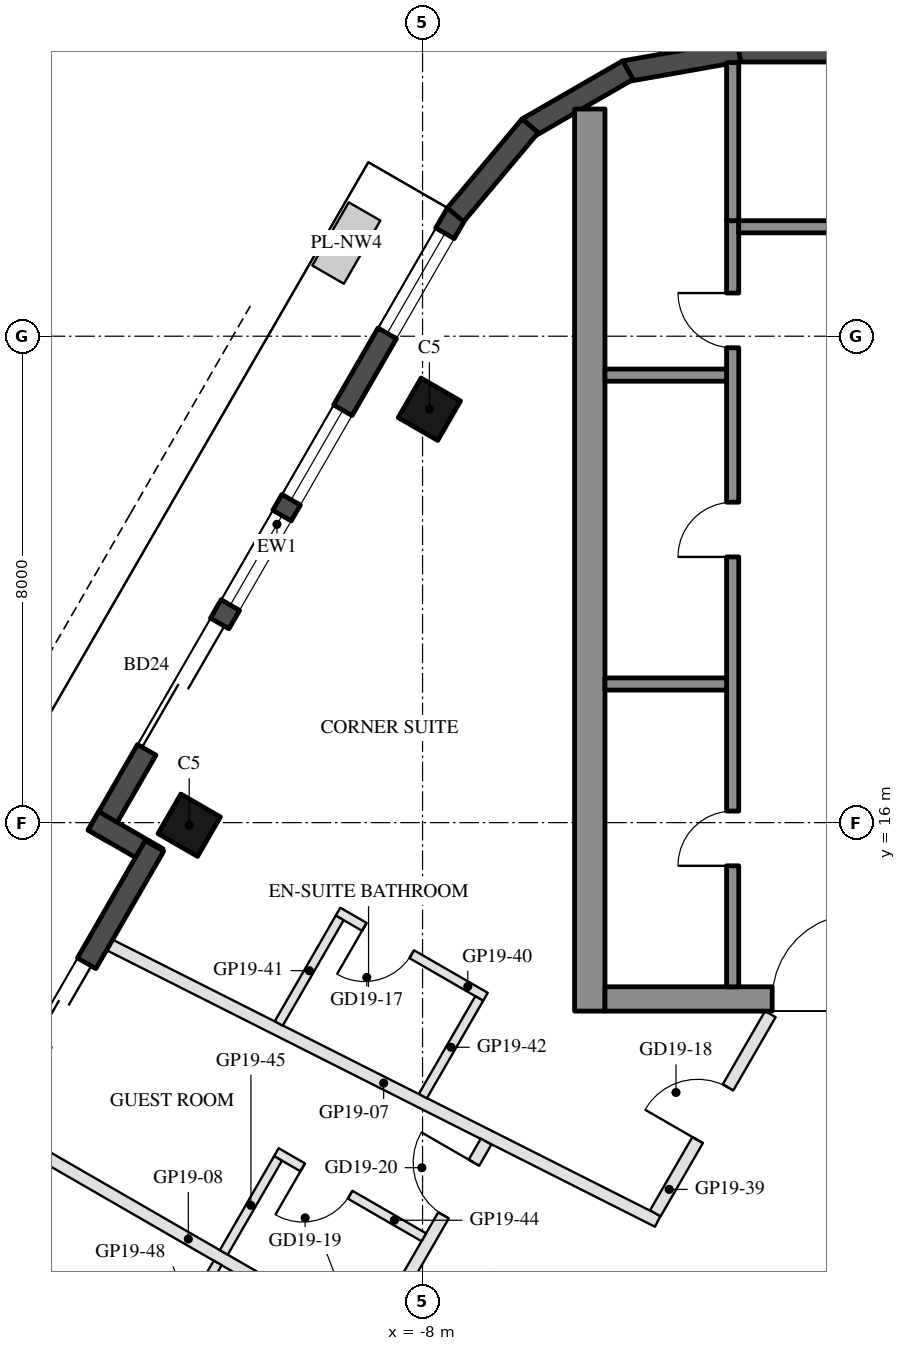
"""IFC4 building model, lengths in metres.
Left out: names, types, materials, properties, quantities, classifications, styles, units other than length and angle.
Written with IfcOpenShell. Run it as: python <this file> out.ifc"""

import sys

from ifc_helpers import new_model, si_unit, direction, frame, frame_2d, origin, origin_2d, place, context, subcontext, project, spatial, rectangle, hollow_rectangle, extrude, element, fill, save


model = new_model("IFC4")
c1 = context("Model", 3, precision=1e-05, world=origin(), true_north=direction((0.0, 1.0)))
c2 = subcontext(c1, "Body", "Model", "MODEL_VIEW")
j1 = project(units=[si_unit("LENGTHUNIT", "METRE"), si_unit("PLANEANGLEUNIT", "RADIAN")], contexts=[c1])
p1 = place(None, origin())
s1 = spatial("IfcSite", under=j1, at=p1, CompositionType="ELEMENT")
p2 = place(p1, origin())
s2 = spatial("IfcBuilding", under=s1, at=p2, CompositionType="ELEMENT")
p3 = place(p2, frame((0.0, 0.0, 202.1)))
s3 = spatial("IfcBuildingStorey", under=s2, at=p3, CompositionType="ELEMENT", Elevation=202.1)
for number, where, z_axis, x_axis in (
    (1, (-7.888, 22.798, 0.0), (0.0, 0.0, 1.0), (0.5, 0.866, 0.0)),
    (2, (-11.838, 15.957, 0.0), (0.0, 0.0, 1.0), (0.5, 0.866, 0.0)),
):
    element("IfcColumn", number, at=place(p3, frame(where, z_axis=z_axis, x_axis=x_axis)), inside=s3, PredefinedType="COLUMN", context=c2, shape_type="SweptSolid", body=[
        extrude(hollow_rectangle(XDim=0.75, YDim=0.75, WallThickness=0.035, at=origin_2d()), origin(), (0.0, 0.0, 1.0), 3.7),
    ])
p4 = place(p3, frame((-7.441, 26.022, 0.0), z_axis=(0.0, 0.0, 1.0), x_axis=(-0.499992533062, -0.86602971478, 0.0)))
e3 = element("IfcWall", 3, at=p4, inside=s3, PredefinedType="SOLIDWALL", context=c2, shape_type="SweptSolid", body=[
    extrude(rectangle(XDim=11.816, YDim=0.35, at=frame_2d((5.908, 0.0))), origin(), (0.0, 0.0, 1.0), 3.55),
])
p5 = place(p4, frame((0.381, 0.0, 0.3)))
e4 = element("IfcOpeningElement", 4, at=p5, cuts=e3, PredefinedType="OPENING", context=c2, shape_type="SweptSolid", body=[
    extrude(rectangle(XDim=1.9, YDim=2.65, at=frame_2d((0.95, 1.325))), frame((0.0, 0.185, 0.0), z_axis=(0.0, -1.0, 0.0), x_axis=(1.0, 0.0, 0.0)), (0.0, 0.0, 1.0), 0.37),
])
p6 = place(p4, frame((7.791, 0.0, 0.0)))
e5 = element("IfcOpeningElement", 5, at=p6, cuts=e3, PredefinedType="OPENING", context=c2, shape_type="SweptSolid", body=[
    extrude(rectangle(XDim=2.4, YDim=2.4, at=frame_2d((1.2, 1.2))), frame((0.0, 0.185, 0.0), z_axis=(0.0, -1.0, 0.0), x_axis=(1.0, 0.0, 0.0)), (0.0, 0.0, 1.0), 0.37),
])
p7 = place(p4, frame((3.741, 0.0, 0.3)))
e6 = element("IfcOpeningElement", 6, at=p7, cuts=e3, PredefinedType="OPENING", context=c2, shape_type="SweptSolid", body=[
    extrude(rectangle(XDim=1.7, YDim=2.65, at=frame_2d((0.85, 1.325))), frame((0.0, 0.185, 0.0), z_axis=(0.0, -1.0, 0.0), x_axis=(1.0, 0.0, 0.0)), (0.0, 0.0, 1.0), 0.37),
])
p8 = place(p4, frame((5.741, 0.0, 0.3)))
e7 = element("IfcOpeningElement", 7, at=p8, cuts=e3, PredefinedType="OPENING", context=c2, shape_type="SweptSolid", body=[
    extrude(rectangle(XDim=1.7, YDim=2.65, at=frame_2d((0.85, 1.325))), frame((0.0, 0.185, 0.0), z_axis=(0.0, -1.0, 0.0), x_axis=(1.0, 0.0, 0.0)), (0.0, 0.0, 1.0), 0.37),
])
p9 = place(p3, frame((-13.413, 16.029, 0.0), z_axis=(0.0, 0.0, 1.0), x_axis=(0.866005645448, -0.500034220881, 0.0)))
e8 = element("IfcWall", 8, at=p9, inside=s3, PredefinedType="SOLIDWALL", context=c2, shape_type="SweptSolid", body=[
    extrude(rectangle(XDim=1.22, YDim=0.35, at=frame_2d((0.61, 0.0))), origin(), (0.0, 0.0, 1.0), 3.55),
])
p10 = place(p3, frame((-12.409, 15.617, 0.0), z_axis=(0.0, 0.0, 1.0), x_axis=(-0.500003597184, -0.866023326939, 0.0)))
e9 = element("IfcWall", 9, at=p10, inside=s3, PredefinedType="SOLIDWALL", context=c2, shape_type="SweptSolid", body=[
    extrude(rectangle(XDim=6.74, YDim=0.35, at=frame_2d((3.37, 0.0))), origin(), (0.0, 0.0, 1.0), 3.55),
])
p11 = place(p10, frame((2.229, 0.0, 0.0)))
e10 = element("IfcOpeningElement", 10, at=p11, cuts=e9, PredefinedType="OPENING", context=c2, shape_type="SweptSolid", body=[
    extrude(rectangle(XDim=1.5, YDim=2.4, at=frame_2d((0.75, 1.2))), frame((0.0, 0.185, 0.0), z_axis=(0.0, -1.0, 0.0), x_axis=(1.0, 0.0, 0.0)), (0.0, 0.0, 1.0), 0.37),
])
p12 = place(p10, frame((4.029, 0.0, 0.3)))
e11 = element("IfcOpeningElement", 11, at=p12, cuts=e9, PredefinedType="OPENING", context=c2, shape_type="SweptSolid", body=[
    extrude(rectangle(XDim=0.8, YDim=2.65, at=frame_2d((0.4, 1.325))), frame((0.0, 0.185, 0.0), z_axis=(0.0, -1.0, 0.0), x_axis=(1.0, 0.0, 0.0)), (0.0, 0.0, 1.0), 0.37),
])
p13 = place(p3, frame((2.829, 28.685, 0.0), z_axis=(0.0, 0.0, 1.0), x_axis=(-1.0, 0.0, 0.0)))
e12 = element("IfcWall", 12, at=p13, inside=s3, PredefinedType="SOLIDWALL", context=c2, shape_type="SweptSolid", body=[
    extrude(rectangle(XDim=5.658, YDim=0.35, at=frame_2d((2.829, 0.0))), origin(), (0.0, 0.0, 1.0), 3.55),
])
for number, where, z_axis, x_axis in (
    (13, (-2.799, 28.688, 0.0), (0.0, 0.0, 1.0), (-0.985, -0.174, 0.0)),
    (14, (-4.623, 28.377, 0.0), (0.0, 0.0, 1.0), (-0.866, -0.5, 0.0)),
):
    element("IfcWall", number, at=place(p3, frame(where, z_axis=z_axis, x_axis=x_axis)), inside=s3, PredefinedType="SOLIDWALL", context=c2, shape_type="SweptSolid", body=[
        extrude(rectangle(XDim=1.91, YDim=0.35, at=frame_2d((0.955, 0.0))), origin(), (0.0, 0.0, 1.0), 3.55),
    ])
p14 = place(p3, frame((-6.23, 27.461, 0.0), z_axis=(0.0, 0.0, 1.0), x_axis=(-0.642808304945, -0.766027077259, 0.0)))
e15 = element("IfcWall", 15, at=p14, inside=s3, PredefinedType="SOLIDWALL", context=c2, shape_type="SweptSolid", body=[
    extrude(rectangle(XDim=1.91, YDim=0.35, at=frame_2d((0.955, 0.0))), origin(), (0.0, 0.0, 1.0), 3.55),
])
p15 = place(p3, frame((-5.25, 12.9, 0.0), z_axis=(0.0, 0.0, 1.0), x_axis=(0.0, 1.0, 0.0)))
e16 = element("IfcWall", 16, at=p15, inside=s3, PredefinedType="SHEAR", context=c2, shape_type="SweptSolid", body=[
    extrude(rectangle(XDim=14.837, YDim=0.5, at=frame_2d((7.418, 0.0))), origin(), (0.0, 0.0, 1.0), 3.5),
])
p16 = place(p3, frame((5.0, 13.1, 0.0), z_axis=(0.0, 0.0, 1.0), x_axis=(-1.0, 0.0, 0.0)))
e17 = element("IfcWall", 17, at=p16, inside=s3, PredefinedType="SHEAR", context=c2, shape_type="SweptSolid", body=[
    extrude(rectangle(XDim=10.0, YDim=0.4, at=frame_2d((5.0, 0.0))), origin(), (0.0, 0.0, 1.0), 3.5),
])
p17 = place(p16, frame((3.55, 0.0, 0.0)))
e18 = element("IfcOpeningElement", 18, at=p17, cuts=e17, PredefinedType="OPENING", context=c2, shape_type="SweptSolid", body=[
    extrude(rectangle(XDim=1.1, YDim=2.1, at=frame_2d((0.55, 1.05))), frame((0.0, 0.21, 0.0), z_axis=(0.0, -1.0, 0.0), x_axis=(1.0, 0.0, 0.0)), (0.0, 0.0, 1.0), 0.42),
])
p18 = place(p16, frame((5.85, 0.0, 0.0)))
e19 = element("IfcOpeningElement", 19, at=p18, cuts=e17, PredefinedType="OPENING", context=c2, shape_type="SweptSolid", body=[
    extrude(rectangle(XDim=1.4, YDim=2.1, at=frame_2d((0.7, 1.05))), frame((0.0, 0.21, 0.0), z_axis=(0.0, -1.0, 0.0), x_axis=(1.0, 0.0, 0.0)), (0.0, 0.0, 1.0), 0.42),
])
p19 = place(p3, frame((-2.9, 13.3, 0.0), z_axis=(0.0, 0.0, 1.0), x_axis=(0.0, 1.0, 0.0)))
e20 = element("IfcWall", 20, at=p19, inside=s3, PredefinedType="SHEAR", context=c2, shape_type="SweptSolid", body=[
    extrude(rectangle(XDim=12.6, YDim=0.2, at=frame_2d((6.3, 0.0))), origin(), (0.0, 0.0, 1.0), 3.5),
])
p20 = place(p19, frame((1.99, 0.0, 0.0)))
e21 = element("IfcOpeningElement", 21, at=p20, cuts=e20, PredefinedType="OPENING", context=c2, shape_type="SweptSolid", body=[
    extrude(rectangle(XDim=0.9, YDim=2.1, at=frame_2d((0.45, 1.05))), frame((0.0, 0.11, 0.0), z_axis=(0.0, -1.0, 0.0), x_axis=(1.0, 0.0, 0.0)), (0.0, 0.0, 1.0), 0.22),
])
p21 = place(p19, frame((7.07, 0.0, 0.0)))
e22 = element("IfcOpeningElement", 22, at=p21, cuts=e20, PredefinedType="OPENING", context=c2, shape_type="SweptSolid", body=[
    extrude(rectangle(XDim=0.9, YDim=2.1, at=frame_2d((0.45, 1.05))), frame((0.0, 0.11, 0.0), z_axis=(0.0, -1.0, 0.0), x_axis=(1.0, 0.0, 0.0)), (0.0, 0.0, 1.0), 0.22),
])
p22 = place(p19, frame((10.51, 0.0, 0.0)))
e23 = element("IfcOpeningElement", 23, at=p22, cuts=e20, PredefinedType="OPENING", context=c2, shape_type="SweptSolid", body=[
    extrude(rectangle(XDim=0.9, YDim=2.1, at=frame_2d((0.45, 1.05))), frame((0.0, 0.11, 0.0), z_axis=(0.0, -1.0, 0.0), x_axis=(1.0, 0.0, 0.0)), (0.0, 0.0, 1.0), 0.22),
])
p23 = place(p3, frame((-0.4, 25.8, 0.0), z_axis=(0.0, 0.0, 1.0), x_axis=(-1.0, 0.0, 0.0)))
e24 = element("IfcWall", 24, at=p23, inside=s3, PredefinedType="SHEAR", context=c2, shape_type="SweptSolid", body=[
    extrude(rectangle(XDim=2.4, YDim=0.2, at=frame_2d((1.2, 0.0))), origin(), (0.0, 0.0, 1.0), 3.5),
])
for number, where, z_axis, x_axis in (
    (25, (-3.0, 18.28, 0.0), (0.0, 0.0, 1.0), (-1.0, 0.0, 0.0)),
    (26, (-3.0, 23.36, 0.0), (0.0, 0.0, 1.0), (-1.0, 0.0, 0.0)),
):
    element("IfcWall", number, at=place(p3, frame(where, z_axis=z_axis, x_axis=x_axis)), inside=s3, PredefinedType="SHEAR", context=c2, shape_type="SweptSolid", body=[
        extrude(rectangle(XDim=2.0, YDim=0.2, at=frame_2d((1.0, 0.0))), origin(), (0.0, 0.0, 1.0), 3.5),
    ])
p24 = place(p3, frame((-2.9, 25.9, 0.0), z_axis=(0.0, 0.0, 1.0), x_axis=(0.0, 1.0, 0.0)))
e27 = element("IfcWall", 27, at=p24, inside=s3, PredefinedType="SHEAR", context=c2, shape_type="SweptSolid", body=[
    extrude(rectangle(XDim=2.6, YDim=0.2, at=frame_2d((1.3, 0.0))), origin(), (0.0, 0.0, 1.0), 3.5),
])
p25 = place(p3, frame((-13.147, 13.989, 0.0), z_axis=(0.0, 0.0, 1.0), x_axis=(0.892898572595, -0.450257858408, 0.0)))
e28 = element("IfcWall", 28, at=p25, inside=s3, PredefinedType="PARTITIONING", context=c2, shape_type="SweptSolid", body=[
    extrude(rectangle(XDim=10.096, YDim=0.2, at=frame_2d((5.048, 0.0))), origin(), (0.0, 0.0, 1.0), 3.06),
])
p26 = place(p3, frame((-14.917, 10.922, 0.0), z_axis=(0.0, 0.0, 1.0), x_axis=(0.866019052629, -0.500011000363, 0.0)))
e29 = element("IfcWall", 29, at=p26, inside=s3, PredefinedType="PARTITIONING", context=c2, shape_type="SweptSolid", body=[
    extrude(rectangle(XDim=7.08, YDim=0.2, at=frame_2d((3.54, 0.0))), origin(), (0.0, 0.0, 1.0), 3.06),
])
p27 = place(p3, frame((-4.172, 9.574, 0.0), z_axis=(0.0, 0.0, 1.0), x_axis=(0.499985062256, 0.866034027923, 0.0)))
e30 = element("IfcWall", 30, at=p27, inside=s3, PredefinedType="PARTITIONING", context=c2, shape_type="SweptSolid", body=[
    extrude(rectangle(XDim=3.782, YDim=0.2, at=frame_2d((1.891, 0.0))), origin(), (0.0, 0.0, 1.0), 2.95),
])
p28 = place(p27, frame((1.391, 0.0, 0.0)))
e31 = element("IfcOpeningElement", 31, at=p28, cuts=e30, PredefinedType="OPENING", context=c2, shape_type="SweptSolid", body=[
    extrude(rectangle(XDim=1.0, YDim=2.1, at=frame_2d((0.5, 1.05))), frame((0.0, 0.11, 0.0), z_axis=(0.0, -1.0, 0.0), x_axis=(1.0, 0.0, 0.0)), (0.0, 0.0, 1.0), 0.22),
])
p29 = place(p3, frame((-6.965, 13.136, 0.0), z_axis=(0.0, 0.0, 1.0), x_axis=(-0.866034573852, 0.49998411664, 0.0)))
e32 = element("IfcWall", 32, at=p29, inside=s3, PredefinedType="PARTITIONING", context=c2, shape_type="SweptSolid", body=[
    extrude(rectangle(XDim=2.8, YDim=0.15, at=frame_2d((1.4, 0.0))), origin(), (0.0, 0.0, 1.0), 2.95),
])
p30 = place(p29, frame((1.4, 0.0, 0.0)))
e33 = element("IfcOpeningElement", 33, at=p30, cuts=e32, PredefinedType="OPENING", context=c2, shape_type="SweptSolid", body=[
    extrude(rectangle(XDim=0.9, YDim=2.1, at=frame_2d((0.45, 1.05))), frame((0.0, 0.085, 0.0), z_axis=(0.0, -1.0, 0.0), x_axis=(1.0, 0.0, 0.0)), (0.0, 0.0, 1.0), 0.17),
])
p31 = place(p3, frame((-9.363, 14.433, 0.0), z_axis=(0.0, 0.0, 1.0), x_axis=(-0.500056363668, -0.86599285976, 0.0)))
e34 = element("IfcWall", 34, at=p31, inside=s3, PredefinedType="PARTITIONING", context=c2, shape_type="SweptSolid", body=[
    extrude(rectangle(XDim=2.004, YDim=0.15, at=frame_2d((1.002, 0.0))), origin(), (0.0, 0.0, 1.0), 2.95),
])
p32 = place(p3, frame((-7.068, 13.108, 0.0), z_axis=(0.0, 0.0, 1.0), x_axis=(-0.4999770169, -0.866038672677, 0.0)))
e35 = element("IfcWall", 35, at=p32, inside=s3, PredefinedType="PARTITIONING", context=c2, shape_type="SweptSolid", body=[
    extrude(rectangle(XDim=1.854, YDim=0.15, at=frame_2d((0.927, 0.0))), origin(), (0.0, 0.0, 1.0), 2.95),
])
p33 = place(p3, frame((-8.823, 7.519, 0.0), z_axis=(0.0, 0.0, 1.0), x_axis=(0.500026055714, 0.866010359988, 0.0)))
e36 = element("IfcWall", 36, at=p33, inside=s3, PredefinedType="PARTITIONING", context=c2, shape_type="SweptSolid", body=[
    extrude(rectangle(XDim=3.736, YDim=0.2, at=frame_2d((1.868, 0.0))), origin(), (0.0, 0.0, 1.0), 2.95),
])
p34 = place(p33, frame((2.336, 0.0, 0.0)))
e37 = element("IfcOpeningElement", 37, at=p34, cuts=e36, PredefinedType="OPENING", context=c2, shape_type="SweptSolid", body=[
    extrude(rectangle(XDim=1.0, YDim=2.1, at=frame_2d((0.5, 1.05))), frame((0.0, 0.11, 0.0), z_axis=(0.0, -1.0, 0.0), x_axis=(1.0, 0.0, 0.0)), (0.0, 0.0, 1.0), 0.22),
])
p35 = place(p3, frame((-7.979, 9.18, 0.0), z_axis=(0.0, 0.0, 1.0), x_axis=(-0.866034573852, 0.49998411664, 0.0)))
e38 = element("IfcWall", 38, at=p35, inside=s3, PredefinedType="PARTITIONING", context=c2, shape_type="SweptSolid", body=[
    extrude(rectangle(XDim=2.8, YDim=0.15, at=frame_2d((1.4, 0.0))), origin(), (0.0, 0.0, 1.0), 2.95),
])
p36 = place(p35, frame((1.4, 0.0, 0.0)))
e39 = element("IfcOpeningElement", 39, at=p36, cuts=e38, PredefinedType="OPENING", context=c2, shape_type="SweptSolid", body=[
    extrude(rectangle(XDim=0.9, YDim=2.1, at=frame_2d((0.45, 1.05))), frame((0.0, 0.085, 0.0), z_axis=(0.0, -1.0, 0.0), x_axis=(1.0, 0.0, 0.0)), (0.0, 0.0, 1.0), 0.17),
])
p37 = place(p3, frame((-10.376, 10.478, 0.0), z_axis=(0.0, 0.0, 1.0), x_axis=(-0.500109033781, -0.865962443949, 0.0)))
e40 = element("IfcWall", 40, at=p37, inside=s3, PredefinedType="PARTITIONING", context=c2, shape_type="SweptSolid", body=[
    extrude(rectangle(XDim=1.786, YDim=0.15, at=frame_2d((0.893, 0.0))), origin(), (0.0, 0.0, 1.0), 2.95),
])
p38 = place(p3, frame((-11.369, 8.758, 0.0), z_axis=(0.0, 0.0, 1.0), x_axis=(-0.500042316284, -0.866000971088, 0.0)))
e41 = element("IfcWall", 41, at=p38, inside=s3, PredefinedType="PARTITIONING", context=c2, shape_type="SweptSolid", body=[
    extrude(rectangle(XDim=1.85, YDim=0.15, at=frame_2d((0.925, 0.0))), origin(), (0.0, 0.0, 1.0), 2.95),
])
p39 = place(p5, origin())
e42 = element("IfcWindow", 42, at=p39, inside=s3, PartitioningType="SINGLE_PANEL", PredefinedType="WINDOW", context=c2, shape_type="SweptSolid", body=[
    extrude(rectangle(XDim=1.9, YDim=2.65, at=frame_2d((0.95, 1.325))), frame((0.0, 0.03, 0.0), z_axis=(0.0, -1.0, 0.0), x_axis=(1.0, 0.0, 0.0)), (0.0, 0.0, 1.0), 0.06),
])
fill(e4, e42)
p40 = place(p6, frame((2.4, 0.0, 0.0), z_axis=(0.0, 0.0, 1.0), x_axis=(-1.0, 0.0, 0.0)))
e43 = element("IfcDoor", 43, at=p40, inside=s3, OperationType="SLIDING_TO_LEFT", PredefinedType="DOOR", context=c2, shape_type="SweptSolid", body=[
    extrude(rectangle(XDim=2.4, YDim=2.4, at=frame_2d((1.2, 1.2))), frame((0.0, 0.025, 0.0), z_axis=(0.0, -1.0, 0.0), x_axis=(1.0, 0.0, 0.0)), (0.0, 0.0, 1.0), 0.05),
])
fill(e5, e43)
p41 = place(p7, origin())
e44 = element("IfcWindow", 44, at=p41, inside=s3, PartitioningType="SINGLE_PANEL", PredefinedType="WINDOW", context=c2, shape_type="SweptSolid", body=[
    extrude(rectangle(XDim=1.7, YDim=2.65, at=frame_2d((0.85, 1.325))), frame((0.0, 0.03, 0.0), z_axis=(0.0, -1.0, 0.0), x_axis=(1.0, 0.0, 0.0)), (0.0, 0.0, 1.0), 0.06),
])
fill(e6, e44)
p42 = place(p8, origin())
e45 = element("IfcWindow", 45, at=p42, inside=s3, PartitioningType="SINGLE_PANEL", PredefinedType="WINDOW", context=c2, shape_type="SweptSolid", body=[
    extrude(rectangle(XDim=1.7, YDim=2.65, at=frame_2d((0.85, 1.325))), frame((0.0, 0.03, 0.0), z_axis=(0.0, -1.0, 0.0), x_axis=(1.0, 0.0, 0.0)), (0.0, 0.0, 1.0), 0.06),
])
fill(e7, e45)
p43 = place(p11, frame((1.5, 0.0, 0.0), z_axis=(0.0, 0.0, 1.0), x_axis=(-1.0, 0.0, 0.0)))
e46 = element("IfcDoor", 46, at=p43, inside=s3, OperationType="SLIDING_TO_LEFT", PredefinedType="DOOR", context=c2, shape_type="SweptSolid", body=[
    extrude(rectangle(XDim=1.5, YDim=2.4, at=frame_2d((0.75, 1.2))), frame((0.0, 0.025, 0.0), z_axis=(0.0, -1.0, 0.0), x_axis=(1.0, 0.0, 0.0)), (0.0, 0.0, 1.0), 0.05),
])
fill(e10, e46)
p44 = place(p20, origin())
e47 = element("IfcDoor", 47, at=p44, inside=s3, OperationType="SINGLE_SWING_LEFT", PredefinedType="DOOR", context=c2, shape_type="SweptSolid", body=[
    extrude(rectangle(XDim=0.9, YDim=2.1, at=frame_2d((0.45, 1.05))), frame((0.0, 0.025, 0.0), z_axis=(0.0, -1.0, 0.0), x_axis=(1.0, 0.0, 0.0)), (0.0, 0.0, 1.0), 0.05),
])
fill(e21, e47)
p45 = place(p21, origin())
e48 = element("IfcDoor", 48, at=p45, inside=s3, OperationType="SINGLE_SWING_LEFT", PredefinedType="DOOR", context=c2, shape_type="SweptSolid", body=[
    extrude(rectangle(XDim=0.9, YDim=2.1, at=frame_2d((0.45, 1.05))), frame((0.0, 0.025, 0.0), z_axis=(0.0, -1.0, 0.0), x_axis=(1.0, 0.0, 0.0)), (0.0, 0.0, 1.0), 0.05),
])
fill(e22, e48)
p46 = place(p22, origin())
e49 = element("IfcDoor", 49, at=p46, inside=s3, OperationType="SINGLE_SWING_RIGHT", PredefinedType="DOOR", context=c2, shape_type="SweptSolid", body=[
    extrude(rectangle(XDim=0.9, YDim=2.1, at=frame_2d((0.45, 1.05))), frame((0.0, 0.025, 0.0), z_axis=(0.0, -1.0, 0.0), x_axis=(1.0, 0.0, 0.0)), (0.0, 0.0, 1.0), 0.05),
])
fill(e23, e49)
p47 = place(p18, frame((1.4, 0.0, 0.0), z_axis=(0.0, 0.0, 1.0), x_axis=(-1.0, 0.0, 0.0)))
e50 = element("IfcDoor", 50, at=p47, inside=s3, OperationType="DOUBLE_DOOR_SINGLE_SWING", PredefinedType="DOOR", context=c2, shape_type="SweptSolid", body=[
    extrude(rectangle(XDim=1.4, YDim=2.1, at=frame_2d((0.7, 1.05))), frame((0.0, 0.025, 0.0), z_axis=(0.0, -1.0, 0.0), x_axis=(1.0, 0.0, 0.0)), (0.0, 0.0, 1.0), 0.05),
])
fill(e19, e50)
p48 = place(p30, origin())
e51 = element("IfcDoor", 51, at=p48, inside=s3, OperationType="SINGLE_SWING_RIGHT", PredefinedType="DOOR", context=c2, shape_type="SweptSolid", body=[
    extrude(rectangle(XDim=0.9, YDim=2.1, at=frame_2d((0.45, 1.05))), frame((0.0, 0.025, 0.0), z_axis=(0.0, -1.0, 0.0), x_axis=(1.0, 0.0, 0.0)), (0.0, 0.0, 1.0), 0.05),
])
fill(e33, e51)
p49 = place(p28, origin())
e52 = element("IfcDoor", 52, at=p49, inside=s3, OperationType="SINGLE_SWING_LEFT", PredefinedType="DOOR", context=c2, shape_type="SweptSolid", body=[
    extrude(rectangle(XDim=1.0, YDim=2.1, at=frame_2d((0.5, 1.05))), frame((0.0, 0.025, 0.0), z_axis=(0.0, -1.0, 0.0), x_axis=(1.0, 0.0, 0.0)), (0.0, 0.0, 1.0), 0.05),
])
fill(e31, e52)
p50 = place(p36, origin())
e53 = element("IfcDoor", 53, at=p50, inside=s3, OperationType="SINGLE_SWING_RIGHT", PredefinedType="DOOR", context=c2, shape_type="SweptSolid", body=[
    extrude(rectangle(XDim=0.9, YDim=2.1, at=frame_2d((0.45, 1.05))), frame((0.0, 0.025, 0.0), z_axis=(0.0, -1.0, 0.0), x_axis=(1.0, 0.0, 0.0)), (0.0, 0.0, 1.0), 0.05),
])
fill(e39, e53)
p51 = place(p34, origin())
e54 = element("IfcDoor", 54, at=p51, inside=s3, OperationType="SINGLE_SWING_RIGHT", PredefinedType="DOOR", context=c2, shape_type="SweptSolid", body=[
    extrude(rectangle(XDim=1.0, YDim=2.1, at=frame_2d((0.5, 1.05))), frame((0.0, 0.025, 0.0), z_axis=(0.0, -1.0, 0.0), x_axis=(1.0, 0.0, 0.0)), (0.0, 0.0, 1.0), 0.05),
])
fill(e37, e54)
save(model, sys.argv[1])
